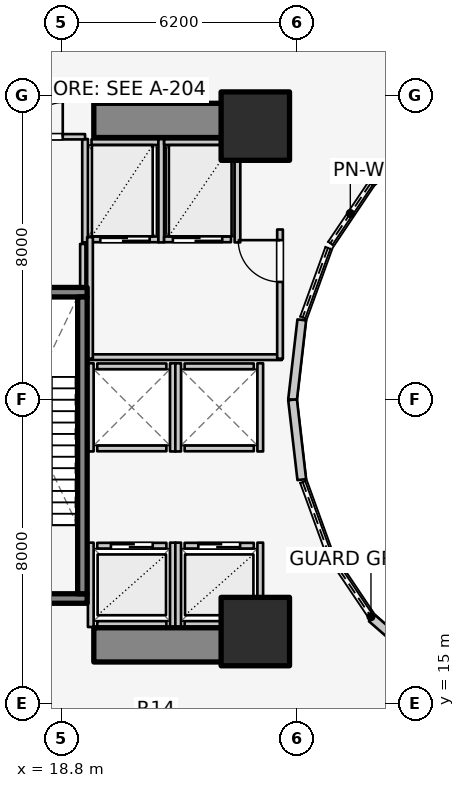
"""IFC4 building model, lengths in metres.
Left out: names, types, materials, properties, quantities, classifications, styles, units other than length and angle.
Written with IfcOpenShell. Run it as: python <this file> out.ifc"""

import sys

from ifc_helpers import new_model, si_unit, direction, frame, frame_2d, origin, origin_2d, place, context, subcontext, project, spatial, rectangle, extrude, element, fill, save


model = new_model("IFC4")
c1 = context("Model", 3, precision=1e-05, world=origin(), true_north=direction((0.0, 1.0)))
c2 = subcontext(c1, "Body", "Model", "MODEL_VIEW")
j1 = project(units=[si_unit("LENGTHUNIT", "METRE"), si_unit("PLANEANGLEUNIT", "RADIAN")], contexts=[c1])
p1 = place(None, origin())
s1 = spatial("IfcSite", under=j1, at=p1, CompositionType="ELEMENT")
p2 = place(p1, origin())
s2 = spatial("IfcBuilding", under=s1, at=p2, CompositionType="ELEMENT")
p3 = place(p2, frame((0.0, 0.0, 13.8)))
s3 = spatial("IfcBuildingStorey", under=s2, at=p3, CompositionType="ELEMENT", Elevation=13.8)
for number, where, z_axis, x_axis in (
    (1, (19.65, 16.55, 0.0), (0.0, 0.0, 1.0), (1.0, 0.0, 0.0)),
    (2, (19.65, 30.35, 0.0), (0.0, 0.0, 1.0), (1.0, 0.0, 0.0)),
):
    element("IfcWall", number, at=place(p3, frame(where, z_axis=z_axis, x_axis=x_axis)), inside=s3, PredefinedType="SHEAR", context=c2, shape_type="SweptSolid", body=[
        extrude(rectangle(XDim=4.5, YDim=0.9, at=frame_2d((2.25, 0.0))), origin(), (0.0, 0.0, 1.0), 4.6),
    ])
p4 = place(p3, frame((16.105, 17.77, 0.0), z_axis=(0.0, 0.0, 1.0), x_axis=(1.0, 0.0, 0.0)))
e3 = element("IfcWall", 3, at=p4, inside=s3, PredefinedType="SOLIDWALL", context=c2, shape_type="SweptSolid", body=[
    extrude(rectangle(XDim=3.37, YDim=0.25, at=frame_2d((1.685, 0.0))), origin(), (0.0, 0.0, 1.0), 4.6),
])
p5 = place(p4, frame((1.135, 0.0, 0.0)))
e4 = element("IfcOpeningElement", 4, at=p5, cuts=e3, PredefinedType="OPENING", context=c2, shape_type="SweptSolid", body=[
    extrude(rectangle(XDim=1.1, YDim=2.1, at=frame_2d((0.55, 1.05))), frame((0.0, 0.135, 0.0), z_axis=(0.0, -1.0, 0.0), x_axis=(1.0, 0.0, 0.0)), (0.0, 0.0, 1.0), 0.27),
])
p6 = place(p3, frame((16.105, 25.83, 0.0), z_axis=(0.0, 0.0, 1.0), x_axis=(1.0, 0.0, 0.0)))
e5 = element("IfcWall", 5, at=p6, inside=s3, PredefinedType="SOLIDWALL", context=c2, shape_type="SweptSolid", body=[
    extrude(rectangle(XDim=3.37, YDim=0.25, at=frame_2d((1.685, 0.0))), origin(), (0.0, 0.0, 1.0), 4.6),
])
p7 = place(p3, frame((19.35, 17.895, 0.0), z_axis=(0.0, 0.0, 1.0), x_axis=(0.0, 1.0, 0.0)))
e6 = element("IfcWall", 6, at=p7, inside=s3, PredefinedType="SOLIDWALL", context=c2, shape_type="SweptSolid", body=[
    extrude(rectangle(XDim=7.81, YDim=0.25, at=frame_2d((3.905, 0.0))), origin(), (0.0, 0.0, 1.0), 4.6),
])
for number, where, z_axis, x_axis in (
    (7, (23.9, 16.9, 0.0), (0.0, 0.0, 1.0), (1.0, 0.0, 0.0)),
    (8, (23.9, 30.2, 0.0), (0.0, 0.0, 1.0), (1.0, 0.0, 0.0)),
):
    element("IfcColumn", number, at=place(p3, frame(where, z_axis=z_axis, x_axis=x_axis)), inside=s3, PredefinedType="COLUMN", context=c2, shape_type="SweptSolid", body=[
        extrude(rectangle(XDim=1.8, YDim=1.8, at=origin_2d()), origin(), (0.0, 0.0, 1.0), 4.6),
    ])
p8 = place(p3, frame((28.44, 30.032, 0.0), z_axis=(0.0, 0.0, 1.0), x_axis=(-0.752576694707, -0.658504607869, 0.0)))
e9 = element("IfcWall", 9, at=p8, inside=s3, PredefinedType="STANDARD", context=c2, shape_type="SweptSolid", body=[
    extrude(rectangle(XDim=1.959, YDim=0.23, at=frame_2d((0.98, 0.0))), origin(), (0.0, 0.0, 1.0), 3.28),
])
for number, where, z_axis, x_axis in (
    (10, (25.123, 25.102, 0.0), (0.0, 0.0, 1.0), (-0.115, -0.993, 0.0)),
    (11, (24.88, 23.0, 0.0), (0.0, 0.0, 1.0), (0.115, -0.993, 0.0)),
):
    element("IfcWall", number, at=place(p3, frame(where, z_axis=z_axis, x_axis=x_axis)), inside=s3, PredefinedType="STANDARD", context=c2, shape_type="SweptSolid", body=[
        extrude(rectangle(XDim=2.115, YDim=0.23, at=frame_2d((1.058, 0.0))), origin(), (0.0, 0.0, 1.0), 3.28),
    ])
p9 = place(p3, frame((26.965, 17.258, 0.0), z_axis=(0.0, 0.0, 1.0), x_axis=(0.752576694707, -0.658504607869, 0.0)))
e12 = element("IfcWall", 12, at=p9, inside=s3, PredefinedType="STANDARD", context=c2, shape_type="SweptSolid", body=[
    extrude(rectangle(XDim=1.959, YDim=0.23, at=frame_2d((0.98, 0.0))), origin(), (0.0, 0.0, 1.0), 3.28),
])
p10 = place(p3, frame((19.74, 19.16, 0.0), z_axis=(0.0, 0.0, 1.0), x_axis=(1.0, 0.0, 0.0)))
e13 = element("IfcWall", 13, at=p10, inside=s3, PredefinedType="SOLIDWALL", context=c2, shape_type="SweptSolid", body=[
    extrude(rectangle(XDim=1.82, YDim=0.15, at=frame_2d((0.91, 0.0))), origin(), (0.0, 0.0, 1.0), 4.255),
])
p11 = place(p10, frame((0.36, 0.0, 0.0)))
e14 = element("IfcOpeningElement", 14, at=p11, cuts=e13, PredefinedType="OPENING", context=c2, shape_type="SweptSolid", body=[
    extrude(rectangle(XDim=1.1, YDim=2.1, at=frame_2d((0.55, 1.05))), frame((0.0, 0.085, 0.0), z_axis=(0.0, -1.0, 0.0), x_axis=(1.0, 0.0, 0.0)), (0.0, 0.0, 1.0), 0.17),
])
p12 = place(p3, frame((19.74, 17.1, 0.0), z_axis=(0.0, 0.0, 1.0), x_axis=(1.0, 0.0, 0.0)))
e15 = element("IfcWall", 15, at=p12, inside=s3, PredefinedType="SOLIDWALL", context=c2, shape_type="SweptSolid", body=[
    extrude(rectangle(XDim=1.82, YDim=0.15, at=frame_2d((0.91, 0.0))), origin(), (0.0, 0.0, 1.0), 4.255),
])
p13 = place(p3, frame((19.57, 17.02, 0.0), z_axis=(0.0, 0.0, 1.0), x_axis=(0.0, 1.0, 0.0)))
e16 = element("IfcWall", 16, at=p13, inside=s3, PredefinedType="SOLIDWALL", context=c2, shape_type="SweptSolid", body=[
    extrude(rectangle(XDim=2.22, YDim=0.15, at=frame_2d((1.11, 0.0))), origin(), (0.0, 0.0, 1.0), 3.62),
])
p14 = place(p3, frame((21.73, 17.02, 0.0), z_axis=(0.0, 0.0, 1.0), x_axis=(0.0, 1.0, 0.0)))
e17 = element("IfcWall", 17, at=p14, inside=s3, PredefinedType="SOLIDWALL", context=c2, shape_type="SweptSolid", body=[
    extrude(rectangle(XDim=2.22, YDim=0.15, at=frame_2d((1.11, 0.0))), origin(), (0.0, 0.0, 1.0), 4.255),
])
p15 = place(p3, frame((22.04, 19.16, 0.0), z_axis=(0.0, 0.0, 1.0), x_axis=(1.0, 0.0, 0.0)))
e18 = element("IfcWall", 18, at=p15, inside=s3, PredefinedType="SOLIDWALL", context=c2, shape_type="SweptSolid", body=[
    extrude(rectangle(XDim=1.82, YDim=0.15, at=frame_2d((0.91, 0.0))), origin(), (0.0, 0.0, 1.0), 3.62),
])
p16 = place(p15, frame((0.36, 0.0, 0.0)))
e19 = element("IfcOpeningElement", 19, at=p16, cuts=e18, PredefinedType="OPENING", context=c2, shape_type="SweptSolid", body=[
    extrude(rectangle(XDim=1.1, YDim=2.1, at=frame_2d((0.55, 1.05))), frame((0.0, 0.085, 0.0), z_axis=(0.0, -1.0, 0.0), x_axis=(1.0, 0.0, 0.0)), (0.0, 0.0, 1.0), 0.17),
])
p17 = place(p3, frame((22.04, 17.1, 0.0), z_axis=(0.0, 0.0, 1.0), x_axis=(1.0, 0.0, 0.0)))
e20 = element("IfcWall", 20, at=p17, inside=s3, PredefinedType="SOLIDWALL", context=c2, shape_type="SweptSolid", body=[
    extrude(rectangle(XDim=1.82, YDim=0.15, at=frame_2d((0.91, 0.0))), origin(), (0.0, 0.0, 1.0), 3.62),
])
p18 = place(p3, frame((21.87, 17.02, 0.0), z_axis=(0.0, 0.0, 1.0), x_axis=(0.0, 1.0, 0.0)))
e21 = element("IfcWall", 21, at=p18, inside=s3, PredefinedType="SOLIDWALL", context=c2, shape_type="SweptSolid", body=[
    extrude(rectangle(XDim=2.22, YDim=0.15, at=frame_2d((1.11, 0.0))), origin(), (0.0, 0.0, 1.0), 4.255),
])
p19 = place(p3, frame((24.03, 17.02, 0.0), z_axis=(0.0, 0.0, 1.0), x_axis=(0.0, 1.0, 0.0)))
e22 = element("IfcWall", 22, at=p19, inside=s3, PredefinedType="SOLIDWALL", context=c2, shape_type="SweptSolid", body=[
    extrude(rectangle(XDim=2.22, YDim=0.15, at=frame_2d((1.11, 0.0))), origin(), (0.0, 0.0, 1.0), 3.3),
])
for number, where, z_axis, x_axis in (
    (23, (19.74, 21.72, 0.0), (0.0, 0.0, 1.0), (1.0, 0.0, 0.0)),
    (24, (19.74, 23.88, 0.0), (0.0, 0.0, 1.0), (1.0, 0.0, 0.0)),
):
    element("IfcWall", number, at=place(p3, frame(where, z_axis=z_axis, x_axis=x_axis)), inside=s3, PredefinedType="SOLIDWALL", context=c2, shape_type="SweptSolid", body=[
        extrude(rectangle(XDim=1.82, YDim=0.15, at=frame_2d((0.91, 0.0))), origin(), (0.0, 0.0, 1.0), 4.255),
    ])
for number, where, z_axis, x_axis in (
    (25, (19.57, 21.64, 0.0), (0.0, 0.0, 1.0), (0.0, 1.0, 0.0)),
    (26, (21.73, 21.64, 0.0), (0.0, 0.0, 1.0), (0.0, 1.0, 0.0)),
):
    element("IfcWall", number, at=place(p3, frame(where, z_axis=z_axis, x_axis=x_axis)), inside=s3, PredefinedType="SOLIDWALL", context=c2, shape_type="SweptSolid", body=[
        extrude(rectangle(XDim=2.32, YDim=0.15, at=frame_2d((1.16, 0.0))), origin(), (0.0, 0.0, 1.0), 4.255),
    ])
for number, where, z_axis, x_axis in (
    (27, (22.04, 21.72, 0.0), (0.0, 0.0, 1.0), (1.0, 0.0, 0.0)),
    (28, (22.04, 23.88, 0.0), (0.0, 0.0, 1.0), (1.0, 0.0, 0.0)),
):
    element("IfcWall", number, at=place(p3, frame(where, z_axis=z_axis, x_axis=x_axis)), inside=s3, PredefinedType="SOLIDWALL", context=c2, shape_type="SweptSolid", body=[
        extrude(rectangle(XDim=1.82, YDim=0.15, at=frame_2d((0.91, 0.0))), origin(), (0.0, 0.0, 1.0), 3.62),
    ])
p20 = place(p3, frame((21.87, 21.64, 0.0), z_axis=(0.0, 0.0, 1.0), x_axis=(0.0, 1.0, 0.0)))
e29 = element("IfcWall", 29, at=p20, inside=s3, PredefinedType="SOLIDWALL", context=c2, shape_type="SweptSolid", body=[
    extrude(rectangle(XDim=2.32, YDim=0.15, at=frame_2d((1.16, 0.0))), origin(), (0.0, 0.0, 1.0), 4.255),
])
p21 = place(p3, frame((24.03, 21.64, 0.0), z_axis=(0.0, 0.0, 1.0), x_axis=(0.0, 1.0, 0.0)))
e30 = element("IfcWall", 30, at=p21, inside=s3, PredefinedType="SOLIDWALL", context=c2, shape_type="SweptSolid", body=[
    extrude(rectangle(XDim=2.32, YDim=0.15, at=frame_2d((1.16, 0.0))), origin(), (0.0, 0.0, 1.0), 3.62),
])
p22 = place(p3, frame((19.59, 27.22, 0.0), z_axis=(0.0, 0.0, 1.0), x_axis=(1.0, 0.0, 0.0)))
e31 = element("IfcWall", 31, at=p22, inside=s3, PredefinedType="SOLIDWALL", context=c2, shape_type="SweptSolid", body=[
    extrude(rectangle(XDim=1.76, YDim=0.15, at=frame_2d((0.88, 0.0))), origin(), (0.0, 0.0, 1.0), 4.255),
])
p23 = place(p22, frame((0.23, 0.0, 0.0)))
e32 = element("IfcOpeningElement", 32, at=p23, cuts=e31, PredefinedType="OPENING", context=c2, shape_type="SweptSolid", body=[
    extrude(rectangle(XDim=1.3, YDim=2.1, at=frame_2d((0.65, 1.05))), frame((0.0, 0.085, 0.0), z_axis=(0.0, -1.0, 0.0), x_axis=(1.0, 0.0, 0.0)), (0.0, 0.0, 1.0), 0.17),
])
p24 = place(p3, frame((19.59, 29.78, 0.0), z_axis=(0.0, 0.0, 1.0), x_axis=(1.0, 0.0, 0.0)))
e33 = element("IfcWall", 33, at=p24, inside=s3, PredefinedType="SOLIDWALL", context=c2, shape_type="SweptSolid", body=[
    extrude(rectangle(XDim=1.76, YDim=0.15, at=frame_2d((0.88, 0.0))), origin(), (0.0, 0.0, 1.0), 4.255),
])
for number, where, z_axis, x_axis in (
    (34, (19.42, 27.14, 0.0), (0.0, 0.0, 1.0), (0.0, 1.0, 0.0)),
    (35, (21.425, 27.14, 0.0), (0.0, 0.0, 1.0), (0.0, 1.0, 0.0)),
):
    element("IfcWall", number, at=place(p3, frame(where, z_axis=z_axis, x_axis=x_axis)), inside=s3, PredefinedType="SOLIDWALL", context=c2, shape_type="SweptSolid", body=[
        extrude(rectangle(XDim=2.72, YDim=0.15, at=frame_2d((1.36, 0.0))), origin(), (0.0, 0.0, 1.0), 4.255),
    ])
p25 = place(p3, frame((21.5, 27.22, 0.0), z_axis=(0.0, 0.0, 1.0), x_axis=(1.0, 0.0, 0.0)))
e36 = element("IfcWall", 36, at=p25, inside=s3, PredefinedType="SOLIDWALL", context=c2, shape_type="SweptSolid", body=[
    extrude(rectangle(XDim=1.76, YDim=0.15, at=frame_2d((0.88, 0.0))), origin(), (0.0, 0.0, 1.0), 4.255),
])
p26 = place(p25, frame((0.23, 0.0, 0.0)))
e37 = element("IfcOpeningElement", 37, at=p26, cuts=e36, PredefinedType="OPENING", context=c2, shape_type="SweptSolid", body=[
    extrude(rectangle(XDim=1.3, YDim=2.1, at=frame_2d((0.65, 1.05))), frame((0.0, 0.085, 0.0), z_axis=(0.0, -1.0, 0.0), x_axis=(1.0, 0.0, 0.0)), (0.0, 0.0, 1.0), 0.17),
])
p27 = place(p3, frame((21.5, 29.78, 0.0), z_axis=(0.0, 0.0, 1.0), x_axis=(1.0, 0.0, 0.0)))
e38 = element("IfcWall", 38, at=p27, inside=s3, PredefinedType="SOLIDWALL", context=c2, shape_type="SweptSolid", body=[
    extrude(rectangle(XDim=1.76, YDim=0.15, at=frame_2d((0.88, 0.0))), origin(), (0.0, 0.0, 1.0), 4.255),
])
p28 = place(p3, frame((23.43, 27.14, 0.0), z_axis=(0.0, 0.0, 1.0), x_axis=(0.0, 1.0, 0.0)))
e39 = element("IfcWall", 39, at=p28, inside=s3, PredefinedType="SOLIDWALL", context=c2, shape_type="SweptSolid", body=[
    extrude(rectangle(XDim=2.72, YDim=0.15, at=frame_2d((1.36, 0.0))), origin(), (0.0, 0.0, 1.0), 4.255),
])
p29 = place(p3, frame((19.52, 24.12, 0.0), z_axis=(0.0, 0.0, 1.0), x_axis=(1.0, 0.0, 0.0)))
e40 = element("IfcWall", 40, at=p29, inside=s3, PredefinedType="PARTITIONING", context=c2, shape_type="SweptSolid", body=[
    extrude(rectangle(XDim=5.08, YDim=0.15, at=frame_2d((2.54, 0.0))), origin(), (0.0, 0.0, 1.0), 3.62),
])
p30 = place(p3, frame((19.55, 24.08, 0.0), z_axis=(0.0, 0.0, 1.0), x_axis=(0.0, 1.0, 0.0)))
e41 = element("IfcWall", 41, at=p30, inside=s3, PredefinedType="PARTITIONING", context=c2, shape_type="SweptSolid", body=[
    extrude(rectangle(XDim=3.2, YDim=0.15, at=frame_2d((1.6, 0.0))), origin(), (0.0, 0.0, 1.0), 4.255),
])
p31 = place(p3, frame((24.55, 24.08, 0.0), z_axis=(0.0, 0.0, 1.0), x_axis=(0.0, 1.0, 0.0)))
e42 = element("IfcWall", 42, at=p31, inside=s3, PredefinedType="PARTITIONING", context=c2, shape_type="SweptSolid", body=[
    extrude(rectangle(XDim=3.4, YDim=0.15, at=frame_2d((1.7, 0.0))), origin(), (0.0, 0.0, 1.0), 4.255),
])
p32 = place(p31, frame((2.02, 0.0, 0.0)))
e43 = element("IfcOpeningElement", 43, at=p32, cuts=e42, PredefinedType="OPENING", context=c2, shape_type="SweptSolid", body=[
    extrude(rectangle(XDim=1.1, YDim=2.1, at=frame_2d((0.55, 1.05))), frame((0.0, 0.085, 0.0), z_axis=(0.0, -1.0, 0.0), x_axis=(1.0, 0.0, 0.0)), (0.0, 0.0, 1.0), 0.17),
])
p33 = place(p3, frame((16.12, 29.92, 0.0), z_axis=(0.0, 0.0, 1.0), x_axis=(1.0, 0.0, 0.0)))
e44 = element("IfcWall", 44, at=p33, inside=s3, PredefinedType="PLUMBINGWALL", context=c2, shape_type="SweptSolid", body=[
    extrude(rectangle(XDim=3.3, YDim=0.14, at=frame_2d((1.65, 0.0))), origin(), (0.0, 0.0, 1.0), 4.255),
])
p34 = place(p33, frame((1.813, 0.0, 0.0)))
e45 = element("IfcOpeningElement", 45, at=p34, cuts=e44, PredefinedType="OPENING", context=c2, shape_type="SweptSolid", body=[
    extrude(rectangle(XDim=0.9, YDim=2.1, at=frame_2d((0.45, 1.05))), frame((0.0, 0.08, 0.0), z_axis=(0.0, -1.0, 0.0), x_axis=(1.0, 0.0, 0.0)), (0.0, 0.0, 1.0), 0.16),
])
p35 = place(p3, frame((19.36, 25.98, 0.0), z_axis=(0.0, 0.0, 1.0), x_axis=(0.0, 1.0, 0.0)))
e46 = element("IfcWall", 46, at=p35, inside=s3, PredefinedType="PLUMBINGWALL", context=c2, shape_type="SweptSolid", body=[
    extrude(rectangle(XDim=1.12, YDim=0.14, at=frame_2d((0.56, 0.0))), origin(), (0.0, 0.0, 1.0), 4.255),
])
p36 = place(p11, origin())
e47 = element("IfcDoor", 47, at=p36, inside=s3, OperationType="DOUBLE_DOOR_SLIDING", PredefinedType="DOOR", context=c2, shape_type="SweptSolid", body=[
    extrude(rectangle(XDim=1.1, YDim=2.1, at=frame_2d((0.55, 1.05))), frame((0.0, 0.025, 0.0), z_axis=(0.0, -1.0, 0.0), x_axis=(1.0, 0.0, 0.0)), (0.0, 0.0, 1.0), 0.05),
])
fill(e14, e47)
p37 = place(p16, origin())
e48 = element("IfcDoor", 48, at=p37, inside=s3, OperationType="DOUBLE_DOOR_SLIDING", PredefinedType="DOOR", context=c2, shape_type="SweptSolid", body=[
    extrude(rectangle(XDim=1.1, YDim=2.1, at=frame_2d((0.55, 1.05))), frame((0.0, 0.025, 0.0), z_axis=(0.0, -1.0, 0.0), x_axis=(1.0, 0.0, 0.0)), (0.0, 0.0, 1.0), 0.05),
])
fill(e19, e48)
p38 = place(p23, origin())
e49 = element("IfcDoor", 49, at=p38, inside=s3, OperationType="DOUBLE_DOOR_SLIDING", PredefinedType="DOOR", context=c2, shape_type="SweptSolid", body=[
    extrude(rectangle(XDim=1.3, YDim=2.1, at=frame_2d((0.65, 1.05))), frame((0.0, 0.025, 0.0), z_axis=(0.0, -1.0, 0.0), x_axis=(1.0, 0.0, 0.0)), (0.0, 0.0, 1.0), 0.05),
])
fill(e32, e49)
p39 = place(p26, origin())
e50 = element("IfcDoor", 50, at=p39, inside=s3, OperationType="DOUBLE_DOOR_SLIDING", PredefinedType="DOOR", context=c2, shape_type="SweptSolid", body=[
    extrude(rectangle(XDim=1.3, YDim=2.1, at=frame_2d((0.65, 1.05))), frame((0.0, 0.025, 0.0), z_axis=(0.0, -1.0, 0.0), x_axis=(1.0, 0.0, 0.0)), (0.0, 0.0, 1.0), 0.05),
])
fill(e37, e50)
p40 = place(p32, origin())
e51 = element("IfcDoor", 51, at=p40, inside=s3, OperationType="SINGLE_SWING_RIGHT", PredefinedType="DOOR", context=c2, shape_type="SweptSolid", body=[
    extrude(rectangle(XDim=1.1, YDim=2.1, at=frame_2d((0.55, 1.05))), frame((0.0, 0.025, 0.0), z_axis=(0.0, -1.0, 0.0), x_axis=(1.0, 0.0, 0.0)), (0.0, 0.0, 1.0), 0.05),
])
fill(e43, e51)
p41 = place(p34, origin())
e52 = element("IfcDoor", 52, at=p41, inside=s3, OperationType="SINGLE_SWING_RIGHT", PredefinedType="DOOR", context=c2, shape_type="SweptSolid", body=[
    extrude(rectangle(XDim=0.9, YDim=2.1, at=frame_2d((0.45, 1.05))), frame((0.0, 0.025, 0.0), z_axis=(0.0, -1.0, 0.0), x_axis=(1.0, 0.0, 0.0)), (0.0, 0.0, 1.0), 0.05),
])
fill(e45, e52)
save(model, sys.argv[1])
